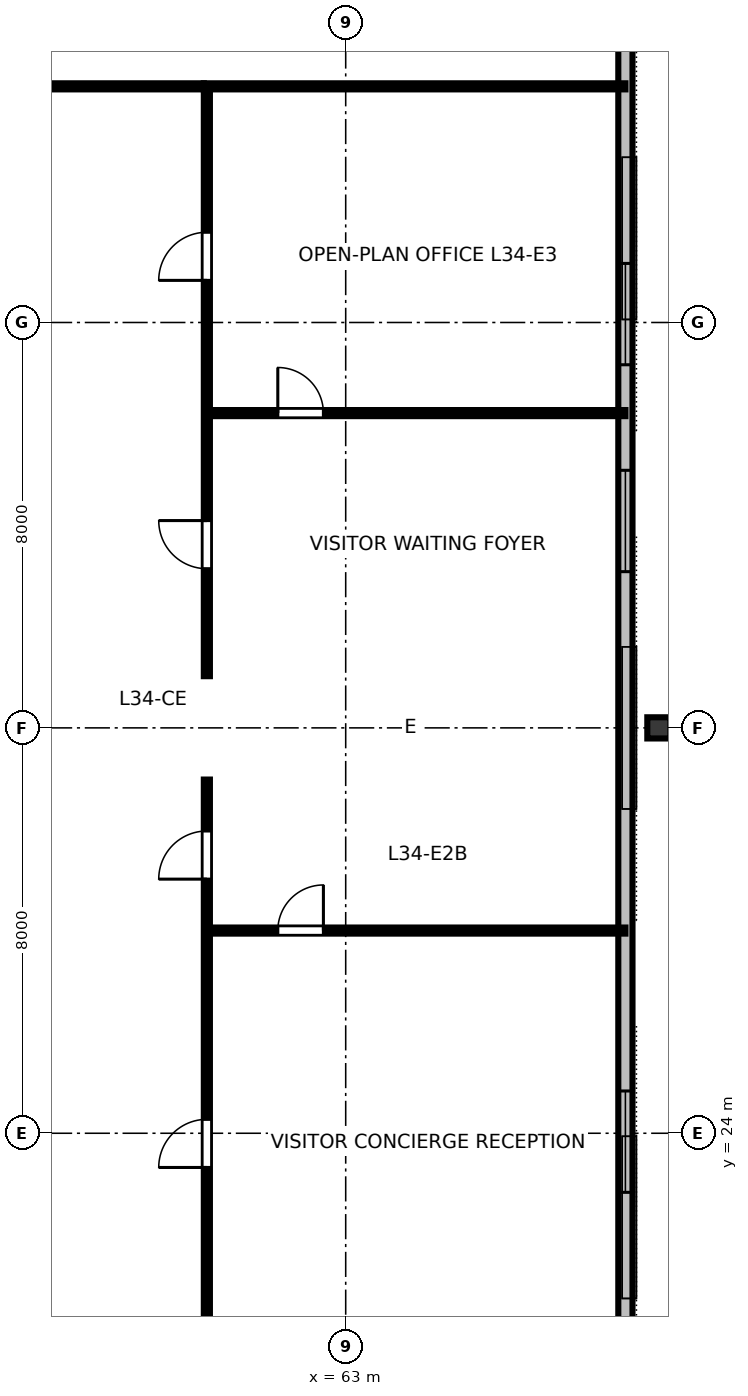
"""IFC4 building model, lengths in metres.
Left out: names, types, materials, properties, quantities, classifications, styles, units other than length and angle.
Written with IfcOpenShell. Run it as: python <this file> out.ifc"""

import sys

from ifc_helpers import new_model, si_unit, direction, frame, frame_2d, origin, origin_2d, place, context, subcontext, project, spatial, rectangle, i_section, extrude, element, fill, save


model = new_model("IFC4")
c1 = context("Model", 3, precision=1e-05, world=origin(), true_north=direction((0.0, 1.0)))
c2 = subcontext(c1, "Body", "Model", "MODEL_VIEW")
j1 = project(units=[si_unit("LENGTHUNIT", "METRE"), si_unit("PLANEANGLEUNIT", "RADIAN")], contexts=[c1])
p1 = place(None, origin())
s1 = spatial("IfcSite", under=j1, at=p1, CompositionType="ELEMENT")
p2 = place(p1, origin())
s2 = spatial("IfcBuilding", under=s1, at=p2, CompositionType="ELEMENT")
p3 = place(p2, frame((0.0, 0.0, 131.2)))
s3 = spatial("IfcBuildingStorey", under=s2, at=p3, CompositionType="ELEMENT", Elevation=131.2)
p4 = place(p3, frame((69.18, 32.0, 0.0), z_axis=(0.0, 0.0, 1.0), x_axis=(0.0, 1.0, 0.0)))
e1 = element("IfcColumn", 1, at=p4, inside=s3, PredefinedType="COLUMN", context=c2, shape_type="SweptSolid", body=[
    extrude(i_section(OverallWidth=0.418, OverallDepth=0.455, WebThickness=0.042, FlangeThickness=0.068, FilletRadius=0.025, at=origin_2d()), origin(), (0.0, 0.0, 1.0), 3.358),
])
p5 = place(p3, frame((68.52, 16.61, 0.0), z_axis=(0.0, 0.0, 1.0), x_axis=(0.0, 1.0, 0.0)))
e2 = element("IfcWall", 2, at=p5, inside=s3, PredefinedType="STANDARD", context=c2, shape_type="SweptSolid", body=[
    extrude(rectangle(XDim=30.78, YDim=0.28, at=frame_2d((15.39, 0.0))), origin(), (0.0, 0.0, 1.0), 3.36),
])
p6 = place(p5, frame((6.224, 0.0, 0.8)))
e3 = element("IfcOpeningElement", 3, at=p6, cuts=e2, PredefinedType="OPENING", context=c2, shape_type="SweptSolid", body=[
    extrude(rectangle(XDim=2.0, YDim=1.95, at=frame_2d((1.0, 0.975))), frame((0.0, 0.15, 0.0), z_axis=(0.0, -1.0, 0.0), x_axis=(1.0, 0.0, 0.0)), (0.0, 0.0, 1.0), 0.3),
])
p7 = place(p5, frame((18.473, 0.0, 0.8)))
e4 = element("IfcOpeningElement", 4, at=p7, cuts=e2, PredefinedType="OPENING", context=c2, shape_type="SweptSolid", body=[
    extrude(rectangle(XDim=2.0, YDim=1.95, at=frame_2d((1.0, 0.975))), frame((0.0, 0.15, 0.0), z_axis=(0.0, -1.0, 0.0), x_axis=(1.0, 0.0, 0.0)), (0.0, 0.0, 1.0), 0.3),
])
p8 = place(p5, frame((22.556, 0.0, 0.8)))
e5 = element("IfcOpeningElement", 5, at=p8, cuts=e2, PredefinedType="OPENING", context=c2, shape_type="SweptSolid", body=[
    extrude(rectangle(XDim=2.0, YDim=1.95, at=frame_2d((1.0, 0.975))), frame((0.0, 0.15, 0.0), z_axis=(0.0, -1.0, 0.0), x_axis=(1.0, 0.0, 0.0)), (0.0, 0.0, 1.0), 0.3),
])
p9 = place(p3, frame((31.8, 44.66, 0.0), z_axis=(0.0, 0.0, 1.0), x_axis=(1.0, 0.0, 0.0)))
e6 = element("IfcWall", 6, at=p9, inside=s3, PredefinedType="PARTITIONING", context=c2, shape_type="SweptSolid", body=[
    extrude(rectangle(XDim=28.4, YDim=0.12, at=frame_2d((14.2, 0.0))), origin(), (0.0, 0.0, 1.0), 2.64),
])
p10 = place(p9, frame((4.544, 0.0, 0.0)))
e7 = element("IfcOpeningElement", 7, at=p10, cuts=e6, PredefinedType="OPENING", context=c2, shape_type="SweptSolid", body=[
    extrude(rectangle(XDim=0.95, YDim=2.15, at=frame_2d((0.475, 1.075))), frame((0.0, 0.07, 0.0), z_axis=(0.0, -1.0, 0.0), x_axis=(1.0, 0.0, 0.0)), (0.0, 0.0, 1.0), 0.14),
])
p11 = place(p9, frame((11.807, 0.0, 0.0)))
e8 = element("IfcOpeningElement", 8, at=p11, cuts=e6, PredefinedType="OPENING", context=c2, shape_type="SweptSolid", body=[
    extrude(rectangle(XDim=0.95, YDim=2.15, at=frame_2d((0.475, 1.075))), frame((0.0, 0.07, 0.0), z_axis=(0.0, -1.0, 0.0), x_axis=(1.0, 0.0, 0.0)), (0.0, 0.0, 1.0), 0.14),
])
p12 = place(p9, frame((17.048, 0.0, 0.0)))
e9 = element("IfcOpeningElement", 9, at=p12, cuts=e6, PredefinedType="OPENING", context=c2, shape_type="SweptSolid", body=[
    extrude(rectangle(XDim=0.95, YDim=2.15, at=frame_2d((0.475, 1.075))), frame((0.0, 0.07, 0.0), z_axis=(0.0, -1.0, 0.0), x_axis=(1.0, 0.0, 0.0)), (0.0, 0.0, 1.0), 0.14),
])
p13 = place(p9, frame((23.845, 0.0, 0.0)))
e10 = element("IfcOpeningElement", 10, at=p13, cuts=e6, PredefinedType="OPENING", context=c2, shape_type="SweptSolid", body=[
    extrude(rectangle(XDim=0.95, YDim=2.15, at=frame_2d((0.475, 1.075))), frame((0.0, 0.07, 0.0), z_axis=(0.0, -1.0, 0.0), x_axis=(1.0, 0.0, 0.0)), (0.0, 0.0, 1.0), 0.14),
])
p14 = place(p3, frame((60.26, 28.0, 0.0), z_axis=(0.0, 0.0, 1.0), x_axis=(1.0, 0.0, 0.0)))
e11 = element("IfcWall", 11, at=p14, inside=s3, PredefinedType="PARTITIONING", context=c2, shape_type="SweptSolid", body=[
    extrude(rectangle(XDim=8.26, YDim=0.12, at=frame_2d((4.13, 0.0))), origin(), (0.0, 0.0, 1.0), 2.64),
])
p15 = place(p14, frame((1.4, 0.0, 0.0)))
e12 = element("IfcOpeningElement", 12, at=p15, cuts=e11, PredefinedType="OPENING", context=c2, shape_type="SweptSolid", body=[
    extrude(rectangle(XDim=0.9, YDim=2.15, at=frame_2d((0.45, 1.075))), frame((0.0, 0.07, 0.0), z_axis=(0.0, -1.0, 0.0), x_axis=(1.0, 0.0, 0.0)), (0.0, 0.0, 1.0), 0.14),
])
p16 = place(p3, frame((60.26, 38.212, 0.0), z_axis=(0.0, 0.0, 1.0), x_axis=(1.0, 0.0, 0.0)))
e13 = element("IfcWall", 13, at=p16, inside=s3, PredefinedType="PARTITIONING", context=c2, shape_type="SweptSolid", body=[
    extrude(rectangle(XDim=8.26, YDim=0.12, at=frame_2d((4.13, 0.0))), origin(), (0.0, 0.0, 1.0), 2.64),
])
p17 = place(p16, frame((1.4, 0.0, 0.0)))
e14 = element("IfcOpeningElement", 14, at=p17, cuts=e13, PredefinedType="OPENING", context=c2, shape_type="SweptSolid", body=[
    extrude(rectangle(XDim=0.9, YDim=2.15, at=frame_2d((0.45, 1.075))), frame((0.0, 0.07, 0.0), z_axis=(0.0, -1.0, 0.0), x_axis=(1.0, 0.0, 0.0)), (0.0, 0.0, 1.0), 0.14),
])
p18 = place(p3, frame((60.26, 19.4, 0.0), z_axis=(0.0, 0.0, 1.0), x_axis=(0.0, 1.0, 0.0)))
e15 = element("IfcWall", 15, at=p18, inside=s3, PredefinedType="PARTITIONING", context=c2, shape_type="SweptSolid", body=[
    extrude(rectangle(XDim=11.58, YDim=0.12, at=frame_2d((5.79, 0.0))), origin(), (0.0, 0.0, 1.0), 2.64),
])
p19 = place(p18, frame((3.925, 0.0, 0.0)))
e16 = element("IfcOpeningElement", 16, at=p19, cuts=e15, PredefinedType="OPENING", context=c2, shape_type="SweptSolid", body=[
    extrude(rectangle(XDim=0.95, YDim=2.15, at=frame_2d((0.475, 1.075))), frame((0.0, 0.07, 0.0), z_axis=(0.0, -1.0, 0.0), x_axis=(1.0, 0.0, 0.0)), (0.0, 0.0, 1.0), 0.14),
])
p20 = place(p18, frame((9.615, 0.0, 0.0)))
e17 = element("IfcOpeningElement", 17, at=p20, cuts=e15, PredefinedType="OPENING", context=c2, shape_type="SweptSolid", body=[
    extrude(rectangle(XDim=0.95, YDim=2.15, at=frame_2d((0.475, 1.075))), frame((0.0, 0.07, 0.0), z_axis=(0.0, -1.0, 0.0), x_axis=(1.0, 0.0, 0.0)), (0.0, 0.0, 1.0), 0.14),
])
p21 = place(p3, frame((60.26, 33.02, 0.0), z_axis=(0.0, 0.0, 1.0), x_axis=(0.0, 1.0, 0.0)))
e18 = element("IfcWall", 18, at=p21, inside=s3, PredefinedType="PARTITIONING", context=c2, shape_type="SweptSolid", body=[
    extrude(rectangle(XDim=11.58, YDim=0.12, at=frame_2d((5.79, 0.0))), origin(), (0.0, 0.0, 1.0), 2.64),
])
p22 = place(p21, frame((2.121, 0.0, 0.0)))
e19 = element("IfcOpeningElement", 19, at=p22, cuts=e18, PredefinedType="OPENING", context=c2, shape_type="SweptSolid", body=[
    extrude(rectangle(XDim=0.95, YDim=2.15, at=frame_2d((0.475, 1.075))), frame((0.0, 0.07, 0.0), z_axis=(0.0, -1.0, 0.0), x_axis=(1.0, 0.0, 0.0)), (0.0, 0.0, 1.0), 0.14),
])
p23 = place(p21, frame((7.811, 0.0, 0.0)))
e20 = element("IfcOpeningElement", 20, at=p23, cuts=e18, PredefinedType="OPENING", context=c2, shape_type="SweptSolid", body=[
    extrude(rectangle(XDim=0.95, YDim=2.15, at=frame_2d((0.475, 1.075))), frame((0.0, 0.07, 0.0), z_axis=(0.0, -1.0, 0.0), x_axis=(1.0, 0.0, 0.0)), (0.0, 0.0, 1.0), 0.14),
])
p24 = place(p3, frame((60.2, 44.66, 0.0), z_axis=(0.0, 0.0, 1.0), x_axis=(1.0, 0.0, 0.0)))
e21 = element("IfcWall", 21, at=p24, inside=s3, PredefinedType="PARTITIONING", context=c2, shape_type="SweptSolid", body=[
    extrude(rectangle(XDim=8.32, YDim=0.12, at=frame_2d((4.16, 0.0))), origin(), (0.0, 0.0, 1.0), 2.64),
])
p25 = place(p6, origin())
e22 = element("IfcWindow", 22, at=p25, inside=s3, PartitioningType="SINGLE_PANEL", PredefinedType="WINDOW", context=c2, shape_type="SweptSolid", body=[
    extrude(rectangle(XDim=2.0, YDim=1.95, at=frame_2d((1.0, 0.975))), frame((0.0, 0.03, 0.0), z_axis=(0.0, -1.0, 0.0), x_axis=(1.0, 0.0, 0.0)), (0.0, 0.0, 1.0), 0.06),
])
fill(e3, e22)
p26 = place(p7, origin())
e23 = element("IfcWindow", 23, at=p26, inside=s3, PartitioningType="SINGLE_PANEL", PredefinedType="WINDOW", context=c2, shape_type="SweptSolid", body=[
    extrude(rectangle(XDim=2.0, YDim=1.95, at=frame_2d((1.0, 0.975))), frame((0.0, 0.03, 0.0), z_axis=(0.0, -1.0, 0.0), x_axis=(1.0, 0.0, 0.0)), (0.0, 0.0, 1.0), 0.06),
])
fill(e4, e23)
p27 = place(p8, origin())
e24 = element("IfcWindow", 24, at=p27, inside=s3, PartitioningType="SINGLE_PANEL", PredefinedType="WINDOW", context=c2, shape_type="SweptSolid", body=[
    extrude(rectangle(XDim=2.0, YDim=1.95, at=frame_2d((1.0, 0.975))), frame((0.0, 0.03, 0.0), z_axis=(0.0, -1.0, 0.0), x_axis=(1.0, 0.0, 0.0)), (0.0, 0.0, 1.0), 0.06),
])
fill(e5, e24)
p28 = place(p15, origin())
e25 = element("IfcDoor", 25, at=p28, inside=s3, OperationType="SINGLE_SWING_RIGHT", PredefinedType="DOOR", context=c2, shape_type="SweptSolid", body=[
    extrude(rectangle(XDim=0.9, YDim=2.15, at=frame_2d((0.45, 1.075))), frame((0.0, 0.025, 0.0), z_axis=(0.0, -1.0, 0.0), x_axis=(1.0, 0.0, 0.0)), (0.0, 0.0, 1.0), 0.05),
])
fill(e12, e25)
p29 = place(p17, origin())
e26 = element("IfcDoor", 26, at=p29, inside=s3, OperationType="SINGLE_SWING_LEFT", PredefinedType="DOOR", context=c2, shape_type="SweptSolid", body=[
    extrude(rectangle(XDim=0.9, YDim=2.15, at=frame_2d((0.45, 1.075))), frame((0.0, 0.025, 0.0), z_axis=(0.0, -1.0, 0.0), x_axis=(1.0, 0.0, 0.0)), (0.0, 0.0, 1.0), 0.05),
])
fill(e14, e26)
p30 = place(p19, origin())
e27 = element("IfcDoor", 27, at=p30, inside=s3, OperationType="SINGLE_SWING_LEFT", PredefinedType="DOOR", context=c2, shape_type="SweptSolid", body=[
    extrude(rectangle(XDim=0.95, YDim=2.15, at=frame_2d((0.475, 1.075))), frame((0.0, 0.025, 0.0), z_axis=(0.0, -1.0, 0.0), x_axis=(1.0, 0.0, 0.0)), (0.0, 0.0, 1.0), 0.05),
])
fill(e16, e27)
p31 = place(p20, origin())
e28 = element("IfcDoor", 28, at=p31, inside=s3, OperationType="SINGLE_SWING_LEFT", PredefinedType="DOOR", context=c2, shape_type="SweptSolid", body=[
    extrude(rectangle(XDim=0.95, YDim=2.15, at=frame_2d((0.475, 1.075))), frame((0.0, 0.025, 0.0), z_axis=(0.0, -1.0, 0.0), x_axis=(1.0, 0.0, 0.0)), (0.0, 0.0, 1.0), 0.05),
])
fill(e17, e28)
p32 = place(p22, origin())
e29 = element("IfcDoor", 29, at=p32, inside=s3, OperationType="SINGLE_SWING_RIGHT", PredefinedType="DOOR", context=c2, shape_type="SweptSolid", body=[
    extrude(rectangle(XDim=0.95, YDim=2.15, at=frame_2d((0.475, 1.075))), frame((0.0, 0.025, 0.0), z_axis=(0.0, -1.0, 0.0), x_axis=(1.0, 0.0, 0.0)), (0.0, 0.0, 1.0), 0.05),
])
fill(e19, e29)
p33 = place(p23, origin())
e30 = element("IfcDoor", 30, at=p33, inside=s3, OperationType="SINGLE_SWING_LEFT", PredefinedType="DOOR", context=c2, shape_type="SweptSolid", body=[
    extrude(rectangle(XDim=0.95, YDim=2.15, at=frame_2d((0.475, 1.075))), frame((0.0, 0.025, 0.0), z_axis=(0.0, -1.0, 0.0), x_axis=(1.0, 0.0, 0.0)), (0.0, 0.0, 1.0), 0.05),
])
fill(e20, e30)
save(model, sys.argv[1])
